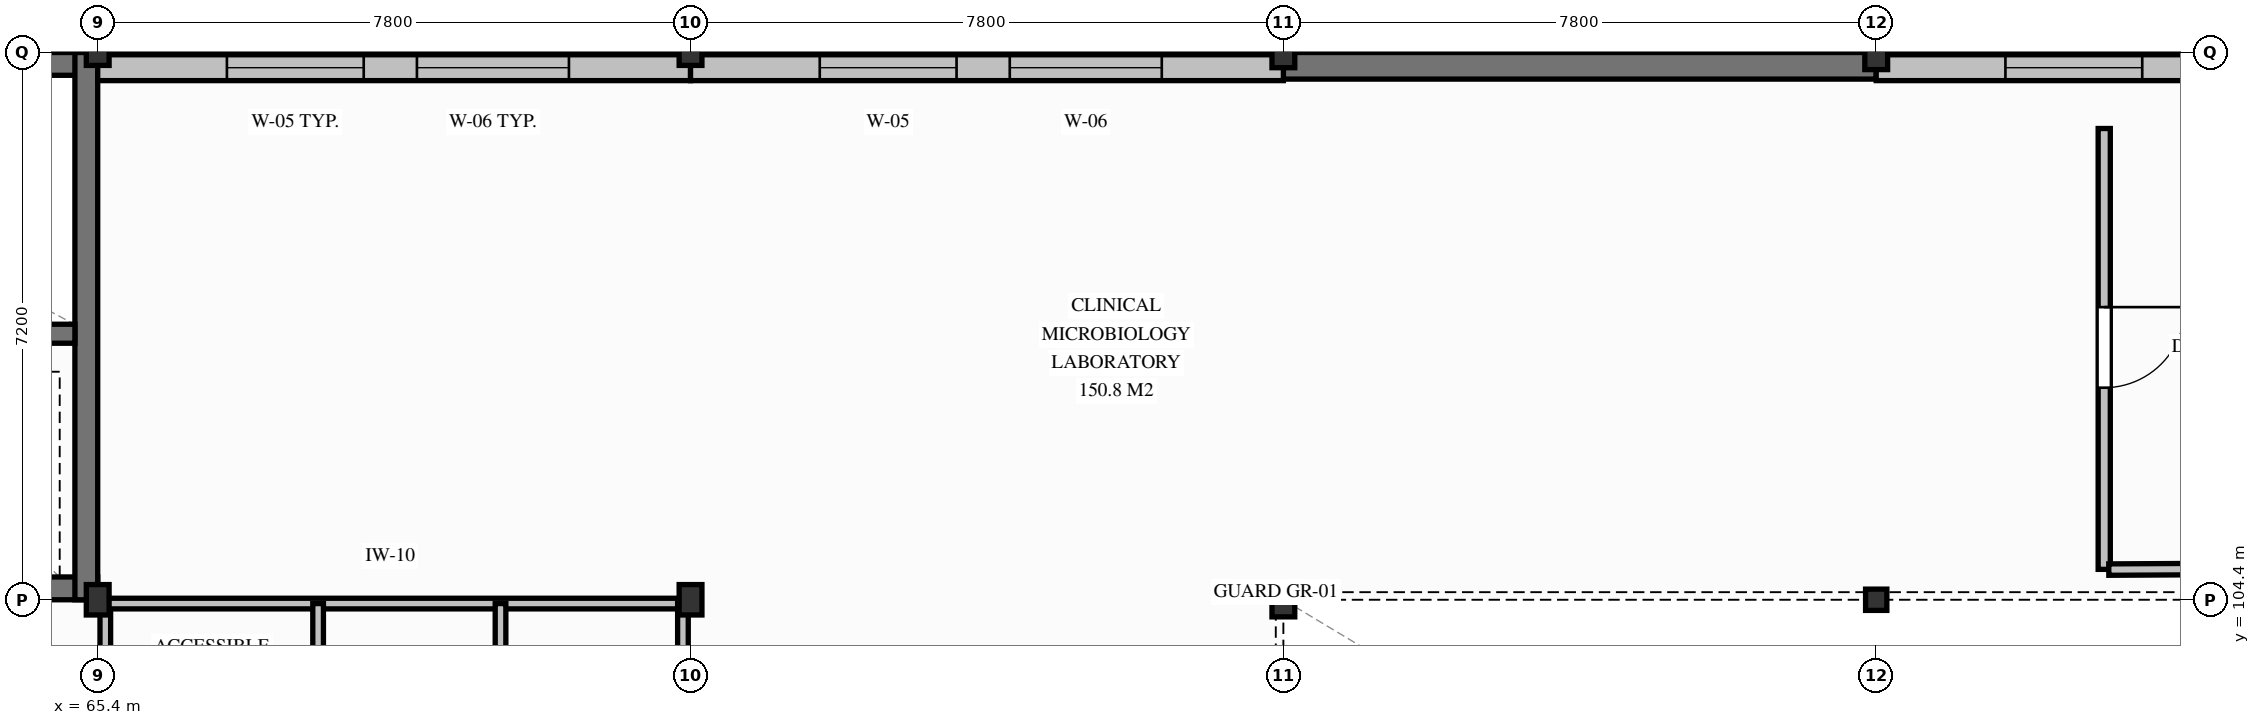
"""IFC4 building model, lengths in metres.
Left out: names, types, materials, properties, quantities, classifications, styles, units other than length and angle.
Written with IfcOpenShell. Run it as: python <this file> out.ifc"""

import sys

from ifc_helpers import new_model, si_unit, direction, frame, frame_2d, origin, origin_2d, place, context, subcontext, project, spatial, rectangle, i_section, extrude, element, fill, save


model = new_model("IFC4")
c1 = context("Model", 3, precision=1e-05, world=origin(), true_north=direction((0.0, 1.0)))
c2 = subcontext(c1, "Body", "Model", "MODEL_VIEW")
j1 = project(units=[si_unit("LENGTHUNIT", "METRE"), si_unit("PLANEANGLEUNIT", "RADIAN")], contexts=[c1])
p1 = place(None, origin())
s1 = spatial("IfcSite", under=j1, at=p1, CompositionType="ELEMENT")
p2 = place(p1, origin())
s2 = spatial("IfcBuilding", under=s1, at=p2, CompositionType="ELEMENT")
p3 = place(p2, frame((0.0, 0.0, 13.2)))
s3 = spatial("IfcBuildingStorey", under=s2, at=p3, CompositionType="ELEMENT", Elevation=13.2)
p4 = place(p3, frame((57.0, 111.45, 0.0), z_axis=(0.0, 0.0, 1.0), x_axis=(1.0, 0.0, 0.0)))
e1 = element("IfcWall", 1, at=p4, inside=s3, PredefinedType="SHEAR", context=c2, shape_type="SweptSolid", body=[
    extrude(rectangle(XDim=8.4, YDim=0.3, at=frame_2d((4.2, 0.0))), origin(), (0.0, 0.0, 1.0), 4.05),
])
p5 = place(p3, frame((57.0, 104.55, 0.0), z_axis=(0.0, 0.0, 1.0), x_axis=(1.0, 0.0, 0.0)))
e2 = element("IfcWall", 2, at=p5, inside=s3, PredefinedType="SHEAR", context=c2, shape_type="SweptSolid", body=[
    extrude(rectangle(XDim=8.4, YDim=0.3, at=frame_2d((4.2, 0.0))), origin(), (0.0, 0.0, 1.0), 4.05),
])
p6 = place(p5, frame((2.8, 0.0, 0.0)))
e3 = element("IfcOpeningElement", 3, at=p6, cuts=e2, PredefinedType="OPENING", context=c2, shape_type="SweptSolid", body=[
    extrude(rectangle(XDim=1.0, YDim=2.1, at=frame_2d((0.5, 1.05))), frame((0.0, 0.16, 0.0), z_axis=(0.0, -1.0, 0.0), x_axis=(1.0, 0.0, 0.0)), (0.0, 0.0, 1.0), 0.32),
])
p7 = place(p5, frame((5.85, 0.0, 0.0)))
e4 = element("IfcOpeningElement", 4, at=p7, cuts=e2, PredefinedType="OPENING", context=c2, shape_type="SweptSolid", body=[
    extrude(rectangle(XDim=1.2, YDim=2.15, at=frame_2d((0.6, 1.075))), frame((0.0, 0.16, 0.0), z_axis=(0.0, -1.0, 0.0), x_axis=(1.0, 0.0, 0.0)), (0.0, 0.0, 1.0), 0.32),
])
p8 = place(p3, frame((65.25, 104.4, 0.0), z_axis=(0.0, 0.0, 1.0), x_axis=(0.0, 1.0, 0.0)))
e5 = element("IfcWall", 5, at=p8, inside=s3, PredefinedType="SHEAR", context=c2, shape_type="SweptSolid", body=[
    extrude(rectangle(XDim=7.2, YDim=0.3, at=frame_2d((3.6, 0.0))), origin(), (0.0, 0.0, 1.0), 4.05),
])
p9 = place(p3, frame((57.3, 107.9, 0.0), z_axis=(0.0, 0.0, 1.0), x_axis=(1.0, 0.0, 0.0)))
e6 = element("IfcWall", 6, at=p9, inside=s3, PredefinedType="SHEAR", context=c2, shape_type="SweptSolid", body=[
    extrude(rectangle(XDim=7.8, YDim=0.25, at=frame_2d((3.9, 0.0))), origin(), (0.0, 0.0, 1.0), 4.05),
])
p10 = place(p3, frame((81.0, 111.425, 0.0), z_axis=(0.0, 0.0, 1.0), x_axis=(1.0, 0.0, 0.0)))
e7 = element("IfcWall", 7, at=p10, inside=s3, PredefinedType="SHEAR", context=c2, shape_type="SweptSolid", body=[
    extrude(rectangle(XDim=7.8, YDim=0.35, at=frame_2d((3.9, 0.0))), origin(), (0.0, 0.0, 1.0), 4.05),
])
p11 = place(p3, frame((65.4, 104.4, 0.0), z_axis=(0.0, 0.0, 1.0), x_axis=(1.0, 0.0, 0.0)))
e8 = element("IfcColumn", 8, at=p11, inside=s3, PredefinedType="COLUMN", context=c2, shape_type="SweptSolid", body=[
    extrude(i_section(OverallWidth=0.3, OverallDepth=0.4, WebThickness=0.013, FlangeThickness=0.024, FilletRadius=0.027, at=origin_2d()), origin(), (0.0, 0.0, 1.0), 4.05),
])
p12 = place(p3, frame((65.4, 111.6, 0.0), z_axis=(0.0, 0.0, 1.0), x_axis=(1.0, 0.0, 0.0)))
e9 = element("IfcColumn", 9, at=p12, inside=s3, PredefinedType="COLUMN", context=c2, shape_type="SweptSolid", body=[
    extrude(i_section(OverallWidth=0.3, OverallDepth=0.34, WebThickness=0.012, FlangeThickness=0.021, FilletRadius=0.027, at=origin_2d()), origin(), (0.0, 0.0, 1.0), 4.05),
])
p13 = place(p3, frame((73.2, 104.4, 0.0), z_axis=(0.0, 0.0, 1.0), x_axis=(1.0, 0.0, 0.0)))
e10 = element("IfcColumn", 10, at=p13, inside=s3, PredefinedType="COLUMN", context=c2, shape_type="SweptSolid", body=[
    extrude(i_section(OverallWidth=0.3, OverallDepth=0.4, WebThickness=0.013, FlangeThickness=0.024, FilletRadius=0.027, at=origin_2d()), origin(), (0.0, 0.0, 1.0), 4.05),
])
p14 = place(p3, frame((73.2, 111.6, 0.0), z_axis=(0.0, 0.0, 1.0), x_axis=(1.0, 0.0, 0.0)))
e11 = element("IfcColumn", 11, at=p14, inside=s3, PredefinedType="COLUMN", context=c2, shape_type="SweptSolid", body=[
    extrude(i_section(OverallWidth=0.3, OverallDepth=0.34, WebThickness=0.012, FlangeThickness=0.021, FilletRadius=0.027, at=origin_2d()), origin(), (0.0, 0.0, 1.0), 4.05),
])
p15 = place(p3, frame((81.0, 104.4, 0.0), z_axis=(0.0, 0.0, 1.0), x_axis=(1.0, 0.0, 0.0)))
e12 = element("IfcColumn", 12, at=p15, inside=s3, PredefinedType="COLUMN", context=c2, shape_type="SweptSolid", body=[
    extrude(i_section(OverallWidth=0.3, OverallDepth=0.45, WebThickness=0.014, FlangeThickness=0.026, FilletRadius=0.027, at=origin_2d()), origin(), (0.0, 0.0, 1.0), 4.05),
])
p16 = place(p3, frame((81.0, 111.6, 0.0), z_axis=(0.0, 0.0, 1.0), x_axis=(1.0, 0.0, 0.0)))
e13 = element("IfcColumn", 13, at=p16, inside=s3, PredefinedType="COLUMN", context=c2, shape_type="SweptSolid", body=[
    extrude(i_section(OverallWidth=0.3, OverallDepth=0.4, WebThickness=0.013, FlangeThickness=0.024, FilletRadius=0.027, at=origin_2d()), origin(), (0.0, 0.0, 1.0), 4.05),
])
p17 = place(p3, frame((88.8, 104.4, 0.0), z_axis=(0.0, 0.0, 1.0), x_axis=(1.0, 0.0, 0.0)))
e14 = element("IfcColumn", 14, at=p17, inside=s3, PredefinedType="COLUMN", context=c2, shape_type="SweptSolid", body=[
    extrude(i_section(OverallWidth=0.28, OverallDepth=0.28, WebThickness=0.01, FlangeThickness=0.018, FilletRadius=0.024, at=origin_2d()), origin(), (0.0, 0.0, 1.0), 4.05),
])
p18 = place(p3, frame((88.8, 111.6, 0.0), z_axis=(0.0, 0.0, 1.0), x_axis=(1.0, 0.0, 0.0)))
e15 = element("IfcColumn", 15, at=p18, inside=s3, PredefinedType="COLUMN", context=c2, shape_type="SweptSolid", body=[
    extrude(i_section(OverallWidth=0.3, OverallDepth=0.45, WebThickness=0.014, FlangeThickness=0.026, FilletRadius=0.027, at=origin_2d()), origin(), (0.0, 0.0, 1.0), 4.05),
])
p19 = place(p3, frame((65.4, 111.4, 0.0), z_axis=(0.0, 0.0, 1.0), x_axis=(1.0, 0.0, 0.0)))
e16 = element("IfcWall", 16, at=p19, inside=s3, PredefinedType="SOLIDWALL", context=c2, shape_type="SweptSolid", body=[
    extrude(rectangle(XDim=7.8, YDim=0.34, at=frame_2d((3.9, 0.0))), origin(), (0.0, 0.0, 1.0), 3.178),
])
p20 = place(p19, frame((1.7, 0.0, 0.85)))
e17 = element("IfcOpeningElement", 17, at=p20, cuts=e16, PredefinedType="OPENING", context=c2, shape_type="SweptSolid", body=[
    extrude(rectangle(XDim=1.8, YDim=1.95, at=frame_2d((0.9, 0.975))), frame((0.0, 0.18, 0.0), z_axis=(0.0, -1.0, 0.0), x_axis=(1.0, 0.0, 0.0)), (0.0, 0.0, 1.0), 0.36),
])
p21 = place(p19, frame((4.2, 0.0, 0.85)))
e18 = element("IfcOpeningElement", 18, at=p21, cuts=e16, PredefinedType="OPENING", context=c2, shape_type="SweptSolid", body=[
    extrude(rectangle(XDim=2.0, YDim=1.95, at=frame_2d((1.0, 0.975))), frame((0.0, 0.18, 0.0), z_axis=(0.0, -1.0, 0.0), x_axis=(1.0, 0.0, 0.0)), (0.0, 0.0, 1.0), 0.36),
])
p22 = place(p3, frame((73.2, 111.4, 0.0), z_axis=(0.0, 0.0, 1.0), x_axis=(1.0, 0.0, 0.0)))
e19 = element("IfcWall", 19, at=p22, inside=s3, PredefinedType="SOLIDWALL", context=c2, shape_type="SweptSolid", body=[
    extrude(rectangle(XDim=7.8, YDim=0.34, at=frame_2d((3.9, 0.0))), origin(), (0.0, 0.0, 1.0), 3.178),
])
p23 = place(p22, frame((1.7, 0.0, 0.85)))
e20 = element("IfcOpeningElement", 20, at=p23, cuts=e19, PredefinedType="OPENING", context=c2, shape_type="SweptSolid", body=[
    extrude(rectangle(XDim=1.8, YDim=1.95, at=frame_2d((0.9, 0.975))), frame((0.0, 0.18, 0.0), z_axis=(0.0, -1.0, 0.0), x_axis=(1.0, 0.0, 0.0)), (0.0, 0.0, 1.0), 0.36),
])
p24 = place(p22, frame((4.2, 0.0, 0.85)))
e21 = element("IfcOpeningElement", 21, at=p24, cuts=e19, PredefinedType="OPENING", context=c2, shape_type="SweptSolid", body=[
    extrude(rectangle(XDim=2.0, YDim=1.95, at=frame_2d((1.0, 0.975))), frame((0.0, 0.18, 0.0), z_axis=(0.0, -1.0, 0.0), x_axis=(1.0, 0.0, 0.0)), (0.0, 0.0, 1.0), 0.36),
])
p25 = place(p3, frame((88.8, 111.4, 0.0), z_axis=(0.0, 0.0, 1.0), x_axis=(1.0, 0.0, 0.0)))
e22 = element("IfcWall", 22, at=p25, inside=s3, PredefinedType="SOLIDWALL", context=c2, shape_type="SweptSolid", body=[
    extrude(rectangle(XDim=7.8, YDim=0.34, at=frame_2d((3.9, 0.0))), origin(), (0.0, 0.0, 1.0), 3.478),
])
p26 = place(p25, frame((1.7, 0.0, 0.85)))
e23 = element("IfcOpeningElement", 23, at=p26, cuts=e22, PredefinedType="OPENING", context=c2, shape_type="SweptSolid", body=[
    extrude(rectangle(XDim=1.8, YDim=1.95, at=frame_2d((0.9, 0.975))), frame((0.0, 0.18, 0.0), z_axis=(0.0, -1.0, 0.0), x_axis=(1.0, 0.0, 0.0)), (0.0, 0.0, 1.0), 0.36),
])
p27 = place(p25, frame((4.2, 0.0, 0.85)))
e24 = element("IfcOpeningElement", 24, at=p27, cuts=e22, PredefinedType="OPENING", context=c2, shape_type="SweptSolid", body=[
    extrude(rectangle(XDim=2.0, YDim=1.95, at=frame_2d((1.0, 0.975))), frame((0.0, 0.18, 0.0), z_axis=(0.0, -1.0, 0.0), x_axis=(1.0, 0.0, 0.0)), (0.0, 0.0, 1.0), 0.36),
])
p28 = place(p3, frame((65.5, 100.7, 0.0), z_axis=(0.0, 0.0, 1.0), x_axis=(0.0, 1.0, 0.0)))
e25 = element("IfcWall", 25, at=p28, inside=s3, PredefinedType="PARTITIONING", context=c2, shape_type="SweptSolid", body=[
    extrude(rectangle(XDim=3.68, YDim=0.14, at=frame_2d((1.84, 0.0))), origin(), (0.0, 0.0, 1.0), 3.438),
])
p29 = place(p3, frame((65.4, 104.35, 0.0), z_axis=(0.0, 0.0, 1.0), x_axis=(1.0, 0.0, 0.0)))
e26 = element("IfcWall", 26, at=p29, inside=s3, PredefinedType="PARTITIONING", context=c2, shape_type="SweptSolid", body=[
    extrude(rectangle(XDim=7.7, YDim=0.14, at=frame_2d((3.85, 0.0))), origin(), (0.0, 0.0, 1.0), 3.178),
])
p30 = place(p3, frame((73.1, 100.7, 0.0), z_axis=(0.0, 0.0, 1.0), x_axis=(0.0, 1.0, 0.0)))
e27 = element("IfcWall", 27, at=p30, inside=s3, PredefinedType="PARTITIONING", context=c2, shape_type="SweptSolid", body=[
    extrude(rectangle(XDim=3.65, YDim=0.14, at=frame_2d((1.825, 0.0))), origin(), (0.0, 0.0, 1.0), 3.178),
])
for number, where, z_axis, x_axis in (
    (28, (68.3, 100.7, 0.0), (0.0, 0.0, 1.0), (0.0, 1.0, 0.0)),
    (29, (70.7, 100.7, 0.0), (0.0, 0.0, 1.0), (0.0, 1.0, 0.0)),
):
    element("IfcWall", number, at=place(p3, frame(where, z_axis=z_axis, x_axis=x_axis)), inside=s3, PredefinedType="PARTITIONING", context=c2, shape_type="SweptSolid", body=[
        extrude(rectangle(XDim=3.65, YDim=0.14, at=frame_2d((1.825, 0.0))), origin(), (0.0, 0.0, 1.0), 3.478),
    ])
p31 = place(p3, frame((91.8, 110.6, 0.0), z_axis=(0.0, 0.0, 1.0), x_axis=(0.0, -1.0, 0.0)))
e30 = element("IfcWall", 30, at=p31, inside=s3, PredefinedType="PARTITIONING", context=c2, shape_type="SweptSolid", body=[
    extrude(rectangle(XDim=5.8, YDim=0.16, at=frame_2d((2.9, 0.0))), origin(), (0.0, 0.0, 1.0), 3.478),
])
p32 = place(p31, frame((2.35, 0.0, 0.0)))
e31 = element("IfcOpeningElement", 31, at=p32, cuts=e30, PredefinedType="OPENING", context=c2, shape_type="SweptSolid", body=[
    extrude(rectangle(XDim=1.06, YDim=2.16, at=frame_2d((0.53, 1.08))), frame((0.0, 0.09, 0.0), z_axis=(0.0, -1.0, 0.0), x_axis=(1.0, 0.0, 0.0)), (0.0, 0.0, 1.0), 0.18),
])
p33 = place(p3, frame((105.38, 104.87, 0.0), z_axis=(0.0, 0.0, 1.0), x_axis=(-0.999985423809, -0.00539927482, 0.0)))
e32 = element("IfcWall", 32, at=p33, inside=s3, PredefinedType="PARTITIONING", context=c2, shape_type="SweptSolid", body=[
    extrude(rectangle(XDim=13.52, YDim=0.15, at=frame_2d((6.76, 0.0))), origin(), (0.0, 0.0, 1.0), 3.378),
])
p34 = place(p20, origin())
e33 = element("IfcWindow", 33, at=p34, inside=s3, PartitioningType="SINGLE_PANEL", PredefinedType="WINDOW", context=c2, shape_type="SweptSolid", body=[
    extrude(rectangle(XDim=1.8, YDim=1.95, at=frame_2d((0.9, 0.975))), frame((0.0, 0.03, 0.0), z_axis=(0.0, -1.0, 0.0), x_axis=(1.0, 0.0, 0.0)), (0.0, 0.0, 1.0), 0.06),
])
fill(e17, e33)
p35 = place(p21, origin())
e34 = element("IfcWindow", 34, at=p35, inside=s3, PartitioningType="SINGLE_PANEL", PredefinedType="WINDOW", context=c2, shape_type="SweptSolid", body=[
    extrude(rectangle(XDim=2.0, YDim=1.95, at=frame_2d((1.0, 0.975))), frame((0.0, 0.03, 0.0), z_axis=(0.0, -1.0, 0.0), x_axis=(1.0, 0.0, 0.0)), (0.0, 0.0, 1.0), 0.06),
])
fill(e18, e34)
p36 = place(p23, origin())
e35 = element("IfcWindow", 35, at=p36, inside=s3, PartitioningType="SINGLE_PANEL", PredefinedType="WINDOW", context=c2, shape_type="SweptSolid", body=[
    extrude(rectangle(XDim=1.8, YDim=1.95, at=frame_2d((0.9, 0.975))), frame((0.0, 0.03, 0.0), z_axis=(0.0, -1.0, 0.0), x_axis=(1.0, 0.0, 0.0)), (0.0, 0.0, 1.0), 0.06),
])
fill(e20, e35)
p37 = place(p24, origin())
e36 = element("IfcWindow", 36, at=p37, inside=s3, PartitioningType="SINGLE_PANEL", PredefinedType="WINDOW", context=c2, shape_type="SweptSolid", body=[
    extrude(rectangle(XDim=2.0, YDim=1.95, at=frame_2d((1.0, 0.975))), frame((0.0, 0.03, 0.0), z_axis=(0.0, -1.0, 0.0), x_axis=(1.0, 0.0, 0.0)), (0.0, 0.0, 1.0), 0.06),
])
fill(e21, e36)
p38 = place(p26, origin())
e37 = element("IfcWindow", 37, at=p38, inside=s3, PartitioningType="SINGLE_PANEL", PredefinedType="WINDOW", context=c2, shape_type="SweptSolid", body=[
    extrude(rectangle(XDim=1.8, YDim=1.95, at=frame_2d((0.9, 0.975))), frame((0.0, 0.03, 0.0), z_axis=(0.0, -1.0, 0.0), x_axis=(1.0, 0.0, 0.0)), (0.0, 0.0, 1.0), 0.06),
])
fill(e23, e37)
p39 = place(p32, origin())
e38 = element("IfcDoor", 38, at=p39, inside=s3, OperationType="SINGLE_SWING_LEFT", PredefinedType="DOOR", context=c2, shape_type="SweptSolid", body=[
    extrude(rectangle(XDim=1.06, YDim=2.16, at=frame_2d((0.53, 1.08))), frame((0.0, 0.025, 0.0), z_axis=(0.0, -1.0, 0.0), x_axis=(1.0, 0.0, 0.0)), (0.0, 0.0, 1.0), 0.05),
])
fill(e31, e38)
save(model, sys.argv[1])
